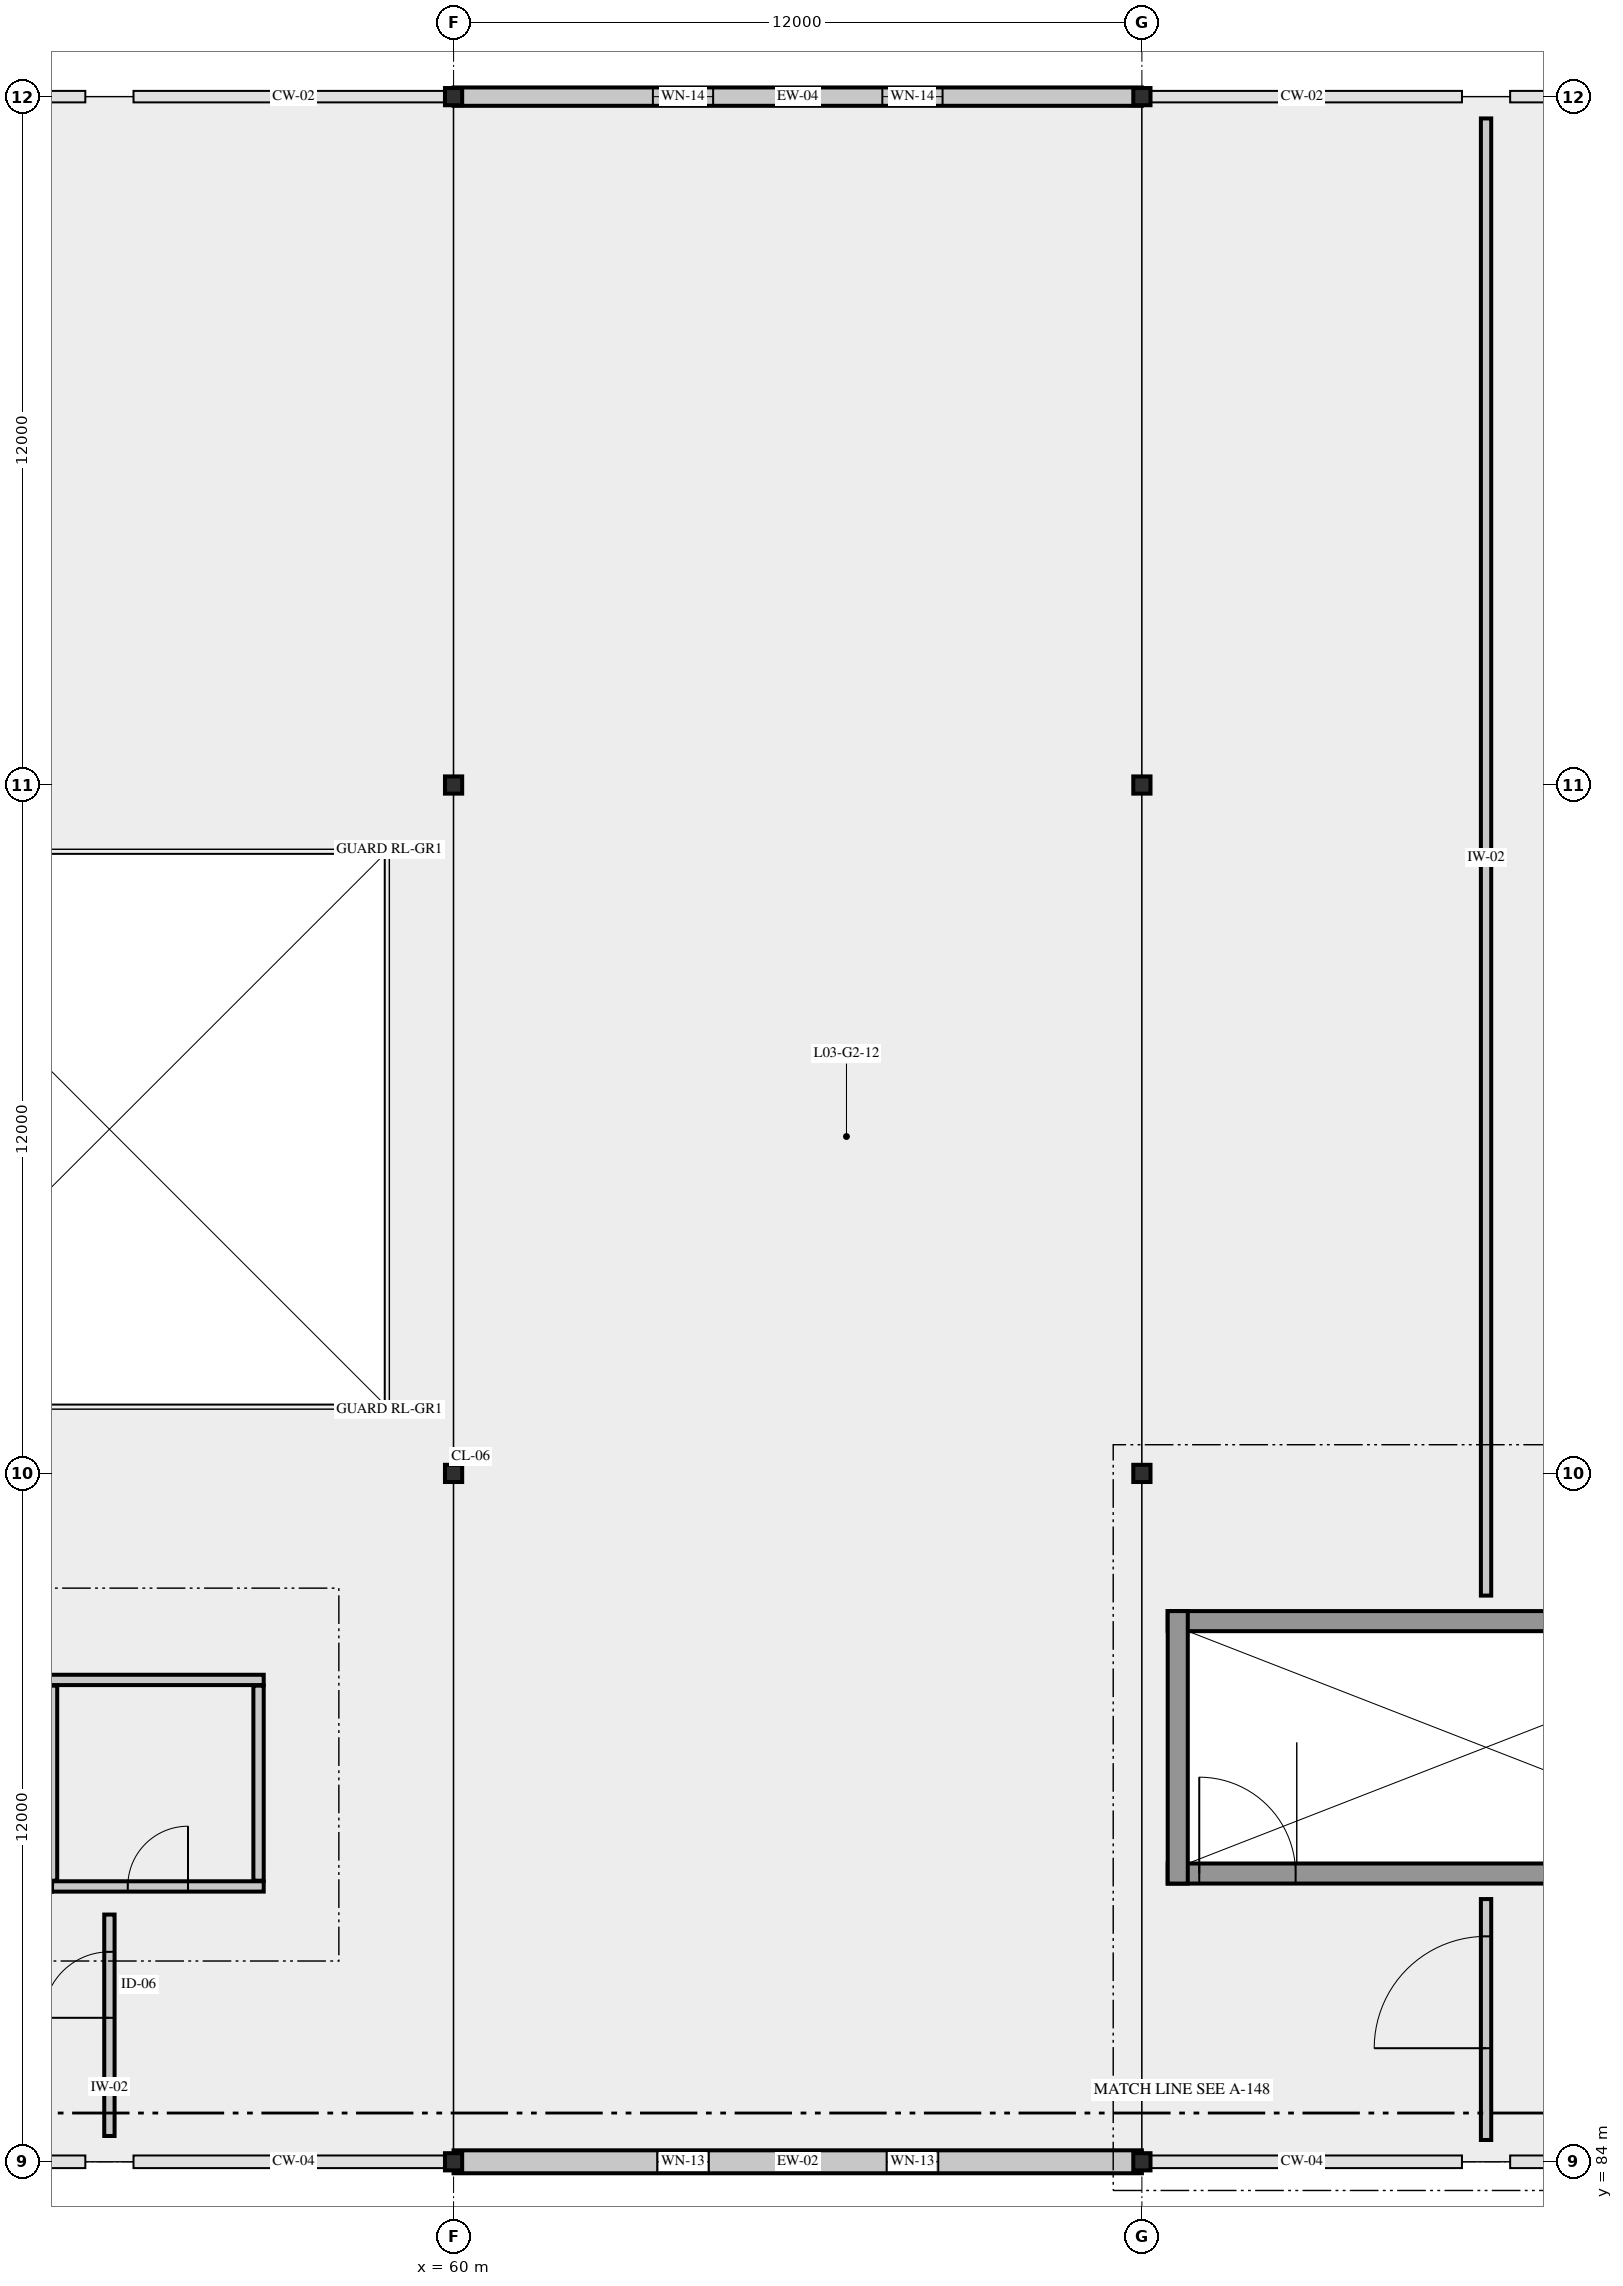
"""IFC4 building model, lengths in metres.
Left out: names, types, materials, properties, quantities, classifications, styles, units other than length and angle.
Written with IfcOpenShell. Run it as: python <this file> out.ifc"""

import sys

from ifc_helpers import new_model, si_unit, direction, frame, frame_2d, origin, origin_2d, place, context, subcontext, project, spatial, rectangle, i_section, extrude, element, fill, save


model = new_model("IFC4")
c1 = context("Model", 3, precision=1e-05, world=origin(), true_north=direction((0.0, 1.0)))
c2 = subcontext(c1, "Body", "Model", "MODEL_VIEW")
j1 = project(units=[si_unit("LENGTHUNIT", "METRE"), si_unit("PLANEANGLEUNIT", "RADIAN")], contexts=[c1])
p1 = place(None, origin())
s1 = spatial("IfcSite", under=j1, at=p1, CompositionType="ELEMENT")
p2 = place(p1, origin())
s2 = spatial("IfcBuilding", under=s1, at=p2, CompositionType="ELEMENT")
p3 = place(p2, frame((0.0, 0.0, 16.8)))
s3 = spatial("IfcBuildingStorey", under=s2, at=p3, CompositionType="ELEMENT", Elevation=16.8)
for number, where, z_axis, x_axis in (
    (1, (60.0, 84.0, 0.0), (0.0, 0.0, 1.0), (1.0, 0.0, 0.0)),
    (2, (60.0, 96.0, 0.0), (0.0, 0.0, 1.0), (1.0, 0.0, 0.0)),
    (3, (60.0, 108.0, 0.0), (0.0, 0.0, 1.0), (1.0, 0.0, 0.0)),
    (4, (60.0, 120.0, 0.0), (0.0, 0.0, 1.0), (1.0, 0.0, 0.0)),
    (5, (72.0, 84.0, 0.0), (0.0, 0.0, 1.0), (1.0, 0.0, 0.0)),
    (6, (72.0, 96.0, 0.0), (0.0, 0.0, 1.0), (1.0, 0.0, 0.0)),
    (7, (72.0, 108.0, 0.0), (0.0, 0.0, 1.0), (1.0, 0.0, 0.0)),
    (8, (72.0, 120.0, 0.0), (0.0, 0.0, 1.0), (1.0, 0.0, 0.0)),
):
    element("IfcColumn", number, at=place(p3, frame(where, z_axis=z_axis, x_axis=x_axis)), inside=s3, PredefinedType="COLUMN", context=c2, shape_type="SweptSolid", body=[
        extrude(i_section(OverallWidth=0.3, OverallDepth=0.3, WebThickness=0.011, FlangeThickness=0.019, FilletRadius=0.027, at=origin_2d()), origin(), (0.0, 0.0, 1.0), 6.6),
    ])
p4 = place(p3, frame((60.0, 84.0, 0.0), z_axis=(0.0, 0.0, 1.0), x_axis=(1.0, 0.0, 0.0)))
e9 = element("IfcWall", 9, at=p4, inside=s3, PredefinedType="SOLIDWALL", context=c2, shape_type="SweptSolid", body=[
    extrude(rectangle(XDim=12.0, YDim=0.4, at=frame_2d((6.0, 0.0))), origin(), (0.0, 0.0, 1.0), 5.6),
])
p5 = place(p4, frame((3.55, 0.0, 0.95)))
e10 = element("IfcOpeningElement", 10, at=p5, cuts=e9, PredefinedType="OPENING", context=c2, shape_type="SweptSolid", body=[
    extrude(rectangle(XDim=0.9, YDim=1.8, at=frame_2d((0.45, 0.9))), frame((0.0, 0.21, 0.0), z_axis=(0.0, -1.0, 0.0), x_axis=(1.0, 0.0, 0.0)), (0.0, 0.0, 1.0), 0.42),
])
p6 = place(p4, frame((7.55, 0.0, 0.95)))
e11 = element("IfcOpeningElement", 11, at=p6, cuts=e9, PredefinedType="OPENING", context=c2, shape_type="SweptSolid", body=[
    extrude(rectangle(XDim=0.9, YDim=1.8, at=frame_2d((0.45, 0.9))), frame((0.0, 0.21, 0.0), z_axis=(0.0, -1.0, 0.0), x_axis=(1.0, 0.0, 0.0)), (0.0, 0.0, 1.0), 0.42),
])
p7 = place(p3, frame((72.0, 120.0, 0.0), z_axis=(0.0, 0.0, 1.0), x_axis=(-1.0, 0.0, 0.0)))
e12 = element("IfcWall", 12, at=p7, inside=s3, PredefinedType="SOLIDWALL", context=c2, shape_type="SweptSolid", body=[
    extrude(rectangle(XDim=12.0, YDim=0.32, at=frame_2d((6.0, 0.0))), origin(), (0.0, 0.0, 1.0), 5.75),
])
p8 = place(p7, frame((3.475, 0.0, 0.95)))
e13 = element("IfcOpeningElement", 13, at=p8, cuts=e12, PredefinedType="OPENING", context=c2, shape_type="SweptSolid", body=[
    extrude(rectangle(XDim=1.05, YDim=1.8, at=frame_2d((0.525, 0.9))), frame((0.0, 0.17, 0.0), z_axis=(0.0, -1.0, 0.0), x_axis=(1.0, 0.0, 0.0)), (0.0, 0.0, 1.0), 0.34),
])
p9 = place(p7, frame((7.475, 0.0, 0.95)))
e14 = element("IfcOpeningElement", 14, at=p9, cuts=e12, PredefinedType="OPENING", context=c2, shape_type="SweptSolid", body=[
    extrude(rectangle(XDim=1.05, YDim=1.8, at=frame_2d((0.525, 0.9))), frame((0.0, 0.17, 0.0), z_axis=(0.0, -1.0, 0.0), x_axis=(1.0, 0.0, 0.0)), (0.0, 0.0, 1.0), 0.34),
])
p10 = place(p3, frame((72.45, 89.025, 0.0), z_axis=(0.0, 0.0, 1.0), x_axis=(1.0, 0.0, 0.0)))
e15 = element("IfcWall", 15, at=p10, inside=s3, PredefinedType="SHEAR", context=c2, shape_type="SweptSolid", body=[
    extrude(rectangle(XDim=11.1, YDim=0.35, at=frame_2d((5.55, 0.0))), origin(), (0.0, 0.0, 1.0), 6.35),
])
p11 = place(p10, frame((0.55, 0.0, 0.0)))
e16 = element("IfcOpeningElement", 16, at=p11, cuts=e15, PredefinedType="OPENING", context=c2, shape_type="SweptSolid", body=[
    extrude(rectangle(XDim=1.68, YDim=2.35, at=frame_2d((0.84, 1.175))), frame((0.0, 0.185, 0.0), z_axis=(0.0, -1.0, 0.0), x_axis=(1.0, 0.0, 0.0)), (0.0, 0.0, 1.0), 0.37),
])
p12 = place(p3, frame((83.55, 93.425, 0.0), z_axis=(0.0, 0.0, 1.0), x_axis=(-1.0, 0.0, 0.0)))
e17 = element("IfcWall", 17, at=p12, inside=s3, PredefinedType="SHEAR", context=c2, shape_type="SweptSolid", body=[
    extrude(rectangle(XDim=11.1, YDim=0.35, at=frame_2d((5.55, 0.0))), origin(), (0.0, 0.0, 1.0), 6.35),
])
p13 = place(p3, frame((72.625, 93.6, 0.0), z_axis=(0.0, 0.0, 1.0), x_axis=(0.0, -1.0, 0.0)))
e18 = element("IfcWall", 18, at=p13, inside=s3, PredefinedType="SHEAR", context=c2, shape_type="SweptSolid", body=[
    extrude(rectangle(XDim=4.75, YDim=0.35, at=frame_2d((2.375, 0.0))), origin(), (0.0, 0.0, 1.0), 6.35),
])
p14 = place(p3, frame((49.31, 92.4, 0.0), z_axis=(0.0, 0.0, 1.0), x_axis=(1.0, 0.0, 0.0)))
e19 = element("IfcWall", 19, at=p14, inside=s3, PredefinedType="PARTITIONING", context=c2, shape_type="SweptSolid", body=[
    extrude(rectangle(XDim=7.38, YDim=0.18, at=frame_2d((3.69, 0.0))), origin(), (0.0, 0.0, 1.0), 6.31),
])
p15 = place(p3, frame((53.0, 88.8, 0.0), z_axis=(0.0, 0.0, 1.0), x_axis=(1.0, 0.0, 0.0)))
e20 = element("IfcWall", 20, at=p15, inside=s3, PredefinedType="PARTITIONING", context=c2, shape_type="SweptSolid", body=[
    extrude(rectangle(XDim=3.69, YDim=0.18, at=frame_2d((1.845, 0.0))), origin(), (0.0, 0.0, 1.0), 6.31),
])
p16 = place(p15, frame((1.32, 0.0, 0.0)))
e21 = element("IfcOpeningElement", 21, at=p16, cuts=e20, PredefinedType="OPENING", context=c2, shape_type="SweptSolid", body=[
    extrude(rectangle(XDim=1.05, YDim=2.2, at=frame_2d((0.525, 1.1))), frame((0.0, 0.1, 0.0), z_axis=(0.0, -1.0, 0.0), x_axis=(1.0, 0.0, 0.0)), (0.0, 0.0, 1.0), 0.2),
])
for number, where, z_axis, x_axis in (
    (22, (56.6, 88.9, 0.0), (0.0, 0.0, 1.0), (0.0, 1.0, 0.0)),
    (23, (53.0, 88.9, 0.0), (0.0, 0.0, 1.0), (0.0, 1.0, 0.0)),
):
    element("IfcWall", number, at=place(p3, frame(where, z_axis=z_axis, x_axis=x_axis)), inside=s3, PredefinedType="PARTITIONING", context=c2, shape_type="SweptSolid", body=[
        extrude(rectangle(XDim=3.4, YDim=0.18, at=frame_2d((1.7, 0.0))), origin(), (0.0, 0.0, 1.0), 6.31),
    ])
p17 = place(p3, frame((54.0, 84.45, 0.0), z_axis=(0.0, 0.0, 1.0), x_axis=(0.0, 1.0, 0.0)))
e24 = element("IfcWall", 24, at=p17, inside=s3, PredefinedType="PARTITIONING", context=c2, shape_type="SweptSolid", body=[
    extrude(rectangle(XDim=3.86, YDim=0.18, at=frame_2d((1.93, 0.0))), origin(), (0.0, 0.0, 1.0), 6.31),
])
p18 = place(p17, frame((2.06, 0.0, 0.0)))
e25 = element("IfcOpeningElement", 25, at=p18, cuts=e24, PredefinedType="OPENING", context=c2, shape_type="SweptSolid", body=[
    extrude(rectangle(XDim=1.15, YDim=2.25, at=frame_2d((0.575, 1.125))), frame((0.0, 0.1, 0.0), z_axis=(0.0, -1.0, 0.0), x_axis=(1.0, 0.0, 0.0)), (0.0, 0.0, 1.0), 0.2),
])
p19 = place(p3, frame((78.0, 84.38, 0.0), z_axis=(0.0, 0.0, 1.0), x_axis=(0.0, 1.0, 0.0)))
e26 = element("IfcWall", 26, at=p19, inside=s3, PredefinedType="PARTITIONING", context=c2, shape_type="SweptSolid", body=[
    extrude(rectangle(XDim=4.2, YDim=0.18, at=frame_2d((2.1, 0.0))), origin(), (0.0, 0.0, 1.0), 6.31),
])
p20 = place(p19, frame((1.6, 0.0, 0.0)))
e27 = element("IfcOpeningElement", 27, at=p20, cuts=e26, PredefinedType="OPENING", context=c2, shape_type="SweptSolid", body=[
    extrude(rectangle(XDim=1.95, YDim=2.45, at=frame_2d((0.975, 1.225))), frame((0.0, 0.1, 0.0), z_axis=(0.0, -1.0, 0.0), x_axis=(1.0, 0.0, 0.0)), (0.0, 0.0, 1.0), 0.2),
])
p21 = place(p3, frame((78.0, 93.87, 0.0), z_axis=(0.0, 0.0, 1.0), x_axis=(0.0, 1.0, 0.0)))
e28 = element("IfcWall", 28, at=p21, inside=s3, PredefinedType="PARTITIONING", context=c2, shape_type="SweptSolid", body=[
    extrude(rectangle(XDim=25.75, YDim=0.18, at=frame_2d((12.875, 0.0))), origin(), (0.0, 0.0, 1.0), 5.87),
])
p22 = place(p5, origin())
e29 = element("IfcWindow", 29, at=p22, inside=s3, PartitioningType="SINGLE_PANEL", PredefinedType="WINDOW", context=c2, shape_type="SweptSolid", body=[
    extrude(rectangle(XDim=0.9, YDim=1.8, at=frame_2d((0.45, 0.9))), frame((0.0, 0.03, 0.0), z_axis=(0.0, -1.0, 0.0), x_axis=(1.0, 0.0, 0.0)), (0.0, 0.0, 1.0), 0.06),
])
fill(e10, e29)
p23 = place(p6, origin())
e30 = element("IfcWindow", 30, at=p23, inside=s3, PartitioningType="SINGLE_PANEL", PredefinedType="WINDOW", context=c2, shape_type="SweptSolid", body=[
    extrude(rectangle(XDim=0.9, YDim=1.8, at=frame_2d((0.45, 0.9))), frame((0.0, 0.03, 0.0), z_axis=(0.0, -1.0, 0.0), x_axis=(1.0, 0.0, 0.0)), (0.0, 0.0, 1.0), 0.06),
])
fill(e11, e30)
p24 = place(p8, origin())
e31 = element("IfcWindow", 31, at=p24, inside=s3, PartitioningType="SINGLE_PANEL", PredefinedType="WINDOW", context=c2, shape_type="SweptSolid", body=[
    extrude(rectangle(XDim=1.05, YDim=1.8, at=frame_2d((0.525, 0.9))), frame((0.0, 0.03, 0.0), z_axis=(0.0, -1.0, 0.0), x_axis=(1.0, 0.0, 0.0)), (0.0, 0.0, 1.0), 0.06),
])
fill(e13, e31)
p25 = place(p9, origin())
e32 = element("IfcWindow", 32, at=p25, inside=s3, PartitioningType="SINGLE_PANEL", PredefinedType="WINDOW", context=c2, shape_type="SweptSolid", body=[
    extrude(rectangle(XDim=1.05, YDim=1.8, at=frame_2d((0.525, 0.9))), frame((0.0, 0.03, 0.0), z_axis=(0.0, -1.0, 0.0), x_axis=(1.0, 0.0, 0.0)), (0.0, 0.0, 1.0), 0.06),
])
fill(e14, e32)
p26 = place(p11, origin())
e33 = element("IfcDoor", 33, at=p26, inside=s3, OperationType="DOUBLE_DOOR_SINGLE_SWING", PredefinedType="DOOR", context=c2, shape_type="SweptSolid", body=[
    extrude(rectangle(XDim=1.68, YDim=2.35, at=frame_2d((0.84, 1.175))), frame((0.0, 0.025, 0.0), z_axis=(0.0, -1.0, 0.0), x_axis=(1.0, 0.0, 0.0)), (0.0, 0.0, 1.0), 0.05),
])
fill(e16, e33)
p27 = place(p16, origin())
e34 = element("IfcDoor", 34, at=p27, inside=s3, OperationType="SINGLE_SWING_RIGHT", PredefinedType="DOOR", context=c2, shape_type="SweptSolid", body=[
    extrude(rectangle(XDim=1.05, YDim=2.2, at=frame_2d((0.525, 1.1))), frame((0.0, 0.025, 0.0), z_axis=(0.0, -1.0, 0.0), x_axis=(1.0, 0.0, 0.0)), (0.0, 0.0, 1.0), 0.05),
])
fill(e21, e34)
p28 = place(p18, origin())
e35 = element("IfcDoor", 35, at=p28, inside=s3, OperationType="SINGLE_SWING_LEFT", PredefinedType="DOOR", context=c2, shape_type="SweptSolid", body=[
    extrude(rectangle(XDim=1.15, YDim=2.25, at=frame_2d((0.575, 1.125))), frame((0.0, 0.025, 0.0), z_axis=(0.0, -1.0, 0.0), x_axis=(1.0, 0.0, 0.0)), (0.0, 0.0, 1.0), 0.05),
])
fill(e25, e35)
p29 = place(p20, origin())
e36 = element("IfcDoor", 36, at=p29, inside=s3, OperationType="DOUBLE_DOOR_SINGLE_SWING", PredefinedType="DOOR", context=c2, shape_type="SweptSolid", body=[
    extrude(rectangle(XDim=1.95, YDim=2.45, at=frame_2d((0.975, 1.225))), frame((0.0, 0.025, 0.0), z_axis=(0.0, -1.0, 0.0), x_axis=(1.0, 0.0, 0.0)), (0.0, 0.0, 1.0), 0.05),
])
fill(e27, e36)
save(model, sys.argv[1])
